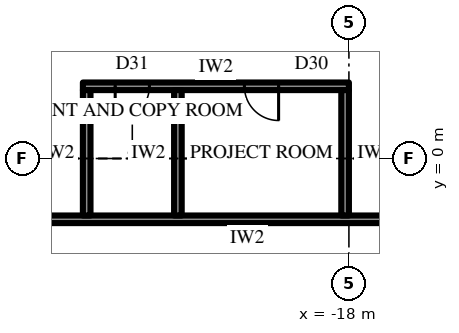
"""IFC4 building model, lengths in metres.
Left out: names, types, materials, properties, quantities, classifications, styles, units other than length and angle.
Written with IfcOpenShell. Run it as: python <this file> out.ifc"""

import sys

from ifc_helpers import new_model, si_unit, direction, frame, frame_2d, origin, place, context, subcontext, project, spatial, rectangle, extrude, element, fill, save


model = new_model("IFC4")
c1 = context("Model", 3, precision=1e-05, world=origin(), true_north=direction((0.0, 1.0)))
c2 = subcontext(c1, "Body", "Model", "MODEL_VIEW")
j1 = project(units=[si_unit("LENGTHUNIT", "METRE"), si_unit("PLANEANGLEUNIT", "RADIAN")], contexts=[c1])
p1 = place(None, origin())
s1 = spatial("IfcSite", under=j1, at=p1, CompositionType="ELEMENT")
p2 = place(p1, origin())
s2 = spatial("IfcBuilding", under=s1, at=p2, CompositionType="ELEMENT")
p3 = place(p2, frame((0.0, 0.0, 336.7)))
s3 = spatial("IfcBuildingStorey", under=s2, at=p3, CompositionType="ELEMENT", Elevation=336.7)
p4 = place(p3, frame((-29.459, -2.175, 0.0), z_axis=(0.0, 0.0, 1.0), x_axis=(0.499996453679, -0.866027451244, 0.0)))
e1 = element("IfcWall", 1, at=p4, inside=s3, PredefinedType="SOLIDWALL", context=c2, shape_type="SweptSolid", body=[
    extrude(rectangle(XDim=9.564, YDim=0.3, at=frame_2d((4.782, 0.0))), origin(), (0.0, 0.0, 1.0), 2.9),
])
p5 = place(p4, frame((0.866, 0.0, 0.6)))
e2 = element("IfcOpeningElement", 2, at=p5, cuts=e1, PredefinedType="OPENING", context=c2, shape_type="SweptSolid", body=[
    extrude(rectangle(XDim=2.55, YDim=2.05, at=frame_2d((1.275, 1.025))), frame((0.0, 0.16, 0.0), z_axis=(0.0, -1.0, 0.0), x_axis=(1.0, 0.0, 0.0)), (0.0, 0.0, 1.0), 0.32),
])
p6 = place(p4, frame((5.823, 0.0, 0.0)))
e3 = element("IfcOpeningElement", 3, at=p6, cuts=e1, PredefinedType="OPENING", context=c2, shape_type="SweptSolid", body=[
    extrude(rectangle(XDim=1.2, YDim=2.4, at=frame_2d((0.6, 1.2))), frame((0.0, 0.16, 0.0), z_axis=(0.0, -1.0, 0.0), x_axis=(1.0, 0.0, 0.0)), (0.0, 0.0, 1.0), 0.32),
])
p7 = place(p3, frame((-12.425, -1.6, 0.0), z_axis=(0.0, 0.0, 1.0), x_axis=(-1.0, 0.0, 0.0)))
e4 = element("IfcWall", 4, at=p7, inside=s3, PredefinedType="PARTITIONING", context=c2, shape_type="SweptSolid", body=[
    extrude(rectangle(XDim=16.5, YDim=0.2, at=frame_2d((8.25, 0.0))), origin(), (0.0, 0.0, 1.0), 4.0),
])
p8 = place(p7, frame((1.15, 0.0, 0.0)))
e5 = element("IfcOpeningElement", 5, at=p8, cuts=e4, PredefinedType="OPENING", context=c2, shape_type="SweptSolid", body=[
    extrude(rectangle(XDim=1.0, YDim=2.2, at=frame_2d((0.5, 1.1))), frame((0.0, 0.11, 0.0), z_axis=(0.0, -1.0, 0.0), x_axis=(1.0, 0.0, 0.0)), (0.0, 0.0, 1.0), 0.22),
])
p9 = place(p3, frame((-18.0, 1.9, 0.0), z_axis=(0.0, 0.0, 1.0), x_axis=(-1.0, 0.0, 0.0)))
e6 = element("IfcWall", 6, at=p9, inside=s3, PredefinedType="PARTITIONING", context=c2, shape_type="SweptSolid", body=[
    extrude(rectangle(XDim=7.0, YDim=0.2, at=frame_2d((3.5, 0.0))), origin(), (0.0, 0.0, 1.0), 4.0),
])
p10 = place(p9, frame((1.85, 0.0, 0.0)))
e7 = element("IfcOpeningElement", 7, at=p10, cuts=e6, PredefinedType="OPENING", context=c2, shape_type="SweptSolid", body=[
    extrude(rectangle(XDim=0.9, YDim=2.2, at=frame_2d((0.45, 1.1))), frame((0.0, 0.11, 0.0), z_axis=(0.0, -1.0, 0.0), x_axis=(1.0, 0.0, 0.0)), (0.0, 0.0, 1.0), 0.22),
])
p11 = place(p9, frame((5.25, 0.0, 0.0)))
e8 = element("IfcOpeningElement", 8, at=p11, cuts=e6, PredefinedType="OPENING", context=c2, shape_type="SweptSolid", body=[
    extrude(rectangle(XDim=0.9, YDim=2.2, at=frame_2d((0.45, 1.1))), frame((0.0, 0.11, 0.0), z_axis=(0.0, -1.0, 0.0), x_axis=(1.0, 0.0, 0.0)), (0.0, 0.0, 1.0), 0.22),
])
for number, where, z_axis, x_axis in (
    (9, (-18.1, -1.5, 0.0), (0.0, 0.0, 1.0), (0.0, 1.0, 0.0)),
    (10, (-22.5, -1.5, 0.0), (0.0, 0.0, 1.0), (0.0, 1.0, 0.0)),
    (11, (-24.9, -1.5, 0.0), (0.0, 0.0, 1.0), (0.0, 1.0, 0.0)),
):
    element("IfcWall", number, at=place(p3, frame(where, z_axis=z_axis, x_axis=x_axis)), inside=s3, PredefinedType="PARTITIONING", context=c2, shape_type="SweptSolid", body=[
        extrude(rectangle(XDim=3.3, YDim=0.2, at=frame_2d((1.65, 0.0))), origin(), (0.0, 0.0, 1.0), 4.0),
    ])
p12 = place(p10, origin())
e12 = element("IfcDoor", 12, at=p12, inside=s3, OperationType="SINGLE_SWING_RIGHT", PredefinedType="DOOR", context=c2, shape_type="SweptSolid", body=[
    extrude(rectangle(XDim=0.9, YDim=2.2, at=frame_2d((0.45, 1.1))), frame((0.0, 0.025, 0.0), z_axis=(0.0, -1.0, 0.0), x_axis=(1.0, 0.0, 0.0)), (0.0, 0.0, 1.0), 0.05),
])
fill(e7, e12)
p13 = place(p11, origin())
e13 = element("IfcDoor", 13, at=p13, inside=s3, OperationType="SINGLE_SWING_LEFT", PredefinedType="DOOR", context=c2, shape_type="SweptSolid", body=[
    extrude(rectangle(XDim=0.9, YDim=2.2, at=frame_2d((0.45, 1.1))), frame((0.0, 0.025, 0.0), z_axis=(0.0, -1.0, 0.0), x_axis=(1.0, 0.0, 0.0)), (0.0, 0.0, 1.0), 0.05),
])
fill(e8, e13)
save(model, sys.argv[1])
